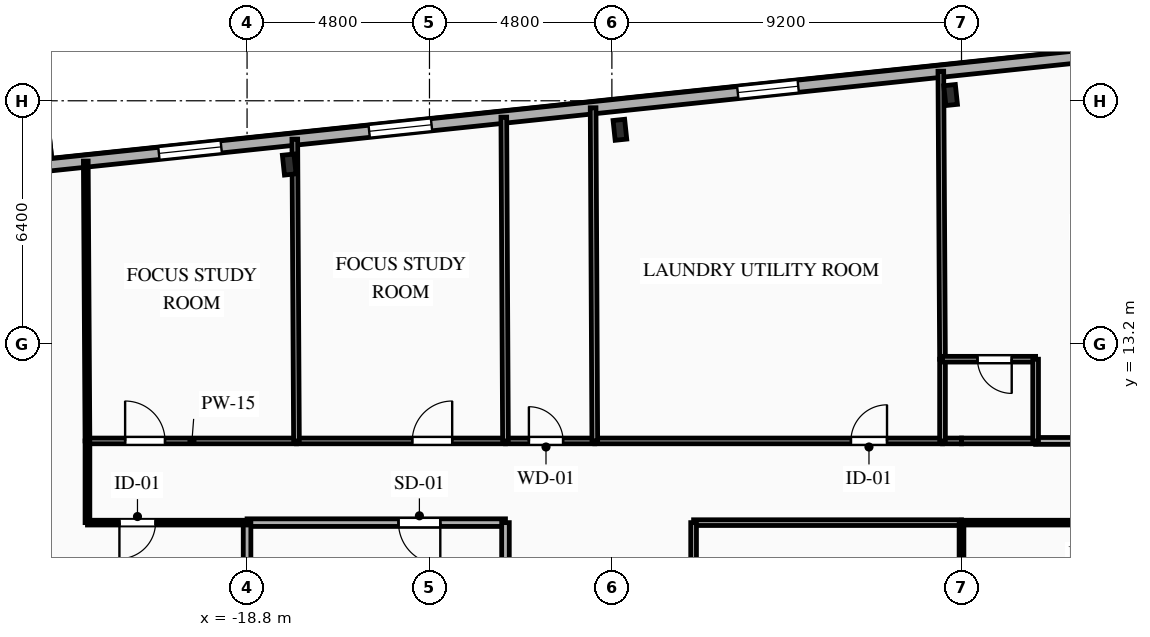
"""IFC4 building model, lengths in metres.
Left out: names, types, materials, properties, quantities, classifications, styles, units other than length and angle.
Written with IfcOpenShell. Run it as: python <this file> out.ifc"""

import sys

from ifc_helpers import new_model, si_unit, direction, frame, frame_2d, origin, origin_2d, place, context, subcontext, project, spatial, rectangle, i_section, extrude, element, fill, save


model = new_model("IFC4")
c1 = context("Model", 3, precision=1e-05, world=origin(), true_north=direction((0.0, 1.0)))
c2 = subcontext(c1, "Body", "Model", "MODEL_VIEW")
j1 = project(units=[si_unit("LENGTHUNIT", "METRE"), si_unit("PLANEANGLEUNIT", "RADIAN")], contexts=[c1])
p1 = place(None, origin())
s1 = spatial("IfcSite", under=j1, at=p1, CompositionType="ELEMENT")
p2 = place(p1, origin())
s2 = spatial("IfcBuilding", under=s1, at=p2, CompositionType="ELEMENT")
p3 = place(p2, frame((0.0, 0.0, 105.8)))
s3 = spatial("IfcBuildingStorey", under=s2, at=p3, CompositionType="ELEMENT", Elevation=105.8)
for number, where, z_axis, x_axis in (
    (1, (-0.287, 19.751, 0.0), (0.0, 0.0, 1.0), (0.995, 0.105, 0.0)),
    (2, (-8.989, 18.836, 0.0), (0.0, 0.0, 1.0), (0.995, 0.105, 0.0)),
    (3, (-17.691, 17.922, 0.0), (0.0, 0.0, 1.0), (0.995, 0.105, 0.0)),
):
    element("IfcColumn", number, at=place(p3, frame(where, z_axis=z_axis, x_axis=x_axis)), inside=s3, PredefinedType="COLUMN", context=c2, shape_type="SweptSolid", body=[
        extrude(i_section(OverallWidth=0.306, OverallDepth=0.524, WebThickness=0.021, FlangeThickness=0.04, FilletRadius=0.027, at=origin_2d()), origin(), (0.0, 0.0, 1.0), 3.35),
    ])
p4 = place(p3, frame((-27.107, 17.586, 0.0), z_axis=(0.0, 0.0, 1.0), x_axis=(0.994521628355, 0.104531003701, 0.0)))
e4 = element("IfcWall", 4, at=p4, inside=s3, PredefinedType="SOLIDWALL", context=c2, shape_type="SweptSolid", body=[
    extrude(rectangle(XDim=53.8, YDim=0.32, at=frame_2d((26.9, 0.0))), origin(), (0.0, 0.0, 1.0), 3.045),
])
p5 = place(p4, frame((1.482, 0.0, 0.85)))
e5 = element("IfcOpeningElement", 5, at=p5, cuts=e4, PredefinedType="OPENING", context=c2, shape_type="SweptSolid", body=[
    extrude(rectangle(XDim=1.6, YDim=1.85, at=frame_2d((0.8, 0.925))), frame((0.0, 0.17, 0.0), z_axis=(0.0, -1.0, 0.0), x_axis=(1.0, 0.0, 0.0)), (0.0, 0.0, 1.0), 0.34),
])
p6 = place(p4, frame((6.02, 0.0, 0.85)))
e6 = element("IfcOpeningElement", 6, at=p6, cuts=e4, PredefinedType="OPENING", context=c2, shape_type="SweptSolid", body=[
    extrude(rectangle(XDim=1.65, YDim=1.85, at=frame_2d((0.825, 0.925))), frame((0.0, 0.17, 0.0), z_axis=(0.0, -1.0, 0.0), x_axis=(1.0, 0.0, 0.0)), (0.0, 0.0, 1.0), 0.34),
])
p7 = place(p4, frame((11.584, 0.0, 0.85)))
e7 = element("IfcOpeningElement", 7, at=p7, cuts=e4, PredefinedType="OPENING", context=c2, shape_type="SweptSolid", body=[
    extrude(rectangle(XDim=1.65, YDim=1.85, at=frame_2d((0.825, 0.925))), frame((0.0, 0.17, 0.0), z_axis=(0.0, -1.0, 0.0), x_axis=(1.0, 0.0, 0.0)), (0.0, 0.0, 1.0), 0.34),
])
p8 = place(p4, frame((21.336, 0.0, 0.85)))
e8 = element("IfcOpeningElement", 8, at=p8, cuts=e4, PredefinedType="OPENING", context=c2, shape_type="SweptSolid", body=[
    extrude(rectangle(XDim=1.6, YDim=1.85, at=frame_2d((0.8, 0.925))), frame((0.0, 0.17, 0.0), z_axis=(0.0, -1.0, 0.0), x_axis=(1.0, 0.0, 0.0)), (0.0, 0.0, 1.0), 0.34),
])
p9 = place(p4, frame((31.404, 0.0, 0.85)))
e9 = element("IfcOpeningElement", 9, at=p9, cuts=e4, PredefinedType="OPENING", context=c2, shape_type="SweptSolid", body=[
    extrude(rectangle(XDim=2.2, YDim=1.85, at=frame_2d((1.1, 0.925))), frame((0.0, 0.17, 0.0), z_axis=(0.0, -1.0, 0.0), x_axis=(1.0, 0.0, 0.0)), (0.0, 0.0, 1.0), 0.34),
])
p10 = place(p4, frame((40.486, 0.0, 0.85)))
e10 = element("IfcOpeningElement", 10, at=p10, cuts=e4, PredefinedType="OPENING", context=c2, shape_type="SweptSolid", body=[
    extrude(rectangle(XDim=1.65, YDim=1.85, at=frame_2d((0.825, 0.925))), frame((0.0, 0.17, 0.0), z_axis=(0.0, -1.0, 0.0), x_axis=(1.0, 0.0, 0.0)), (0.0, 0.0, 1.0), 0.34),
])
p11 = place(p4, frame((46.53, 0.0, 0.85)))
e11 = element("IfcOpeningElement", 11, at=p11, cuts=e4, PredefinedType="OPENING", context=c2, shape_type="SweptSolid", body=[
    extrude(rectangle(XDim=1.65, YDim=1.85, at=frame_2d((0.825, 0.925))), frame((0.0, 0.17, 0.0), z_axis=(0.0, -1.0, 0.0), x_axis=(1.0, 0.0, 0.0)), (0.0, 0.0, 1.0), 0.34),
])
p12 = place(p4, frame((51.054, 0.0, 0.85)))
e12 = element("IfcOpeningElement", 12, at=p12, cuts=e4, PredefinedType="OPENING", context=c2, shape_type="SweptSolid", body=[
    extrude(rectangle(XDim=1.65, YDim=1.85, at=frame_2d((0.825, 0.925))), frame((0.0, 0.17, 0.0), z_axis=(0.0, -1.0, 0.0), x_axis=(1.0, 0.0, 0.0)), (0.0, 0.0, 1.0), 0.34),
])
p13 = place(p3, frame((-12.0, 8.5, 0.0), z_axis=(0.0, 0.0, 1.0), x_axis=(-1.0, 0.0, 0.0)))
e13 = element("IfcWall", 13, at=p13, inside=s3, PredefinedType="PARTITIONING", context=c2, shape_type="SweptSolid", body=[
    extrude(rectangle(XDim=6.8, YDim=0.2, at=frame_2d((3.4, 0.0))), origin(), (0.0, 0.0, 1.0), 3.045),
])
p14 = place(p13, frame((1.715, 0.0, 0.0)))
e14 = element("IfcOpeningElement", 14, at=p14, cuts=e13, PredefinedType="OPENING", context=c2, shape_type="SweptSolid", body=[
    extrude(rectangle(XDim=1.1, YDim=2.15, at=frame_2d((0.55, 1.075))), frame((0.0, 0.11, 0.0), z_axis=(0.0, -1.0, 0.0), x_axis=(1.0, 0.0, 0.0)), (0.0, 0.0, 1.0), 0.22),
])
p15 = place(p3, frame((-12.0, 5.6, 0.0), z_axis=(0.0, 0.0, 1.0), x_axis=(0.0, 1.0, 0.0)))
e15 = element("IfcWall", 15, at=p15, inside=s3, PredefinedType="PARTITIONING", context=c2, shape_type="SweptSolid", body=[
    extrude(rectangle(XDim=2.9, YDim=0.2, at=frame_2d((1.45, 0.0))), origin(), (0.0, 0.0, 1.0), 3.045),
])
p16 = place(p3, frame((-18.8, 8.5, 0.0), z_axis=(0.0, 0.0, 1.0), x_axis=(0.0, -1.0, 0.0)))
e16 = element("IfcWall", 16, at=p16, inside=s3, PredefinedType="PARTITIONING", context=c2, shape_type="SweptSolid", body=[
    extrude(rectangle(XDim=2.9, YDim=0.2, at=frame_2d((1.45, 0.0))), origin(), (0.0, 0.0, 1.0), 2.53),
])
p17 = place(p3, frame((-18.8, 8.5, 0.0), z_axis=(0.0, 0.0, 1.0), x_axis=(-1.0, 0.0, 0.0)))
e17 = element("IfcWall", 17, at=p17, inside=s3, PredefinedType="PARTITIONING", context=c2, shape_type="SweptSolid", body=[
    extrude(rectangle(XDim=4.2, YDim=0.125, at=frame_2d((2.1, 0.0))), origin(), (0.0, 0.0, 1.0), 3.045),
])
p18 = place(p17, frame((2.409, 0.0, 0.0)))
e18 = element("IfcOpeningElement", 18, at=p18, cuts=e17, PredefinedType="OPENING", context=c2, shape_type="SweptSolid", body=[
    extrude(rectangle(XDim=0.95, YDim=2.1, at=frame_2d((0.475, 1.05))), frame((0.0, 0.073, 0.0), z_axis=(0.0, -1.0, 0.0), x_axis=(1.0, 0.0, 0.0)), (0.0, 0.0, 1.0), 0.145),
])
p19 = place(p3, frame((-23.0, 8.5, 0.0), z_axis=(0.0, 0.0, 1.0), x_axis=(0.0, 1.0, 0.0)))
e19 = element("IfcWall", 19, at=p19, inside=s3, PredefinedType="PARTITIONING", context=c2, shape_type="SweptSolid", body=[
    extrude(rectangle(XDim=2.15, YDim=0.125, at=frame_2d((1.075, 0.0))), origin(), (0.0, 0.0, 1.0), 3.045),
])
p20 = place(p3, frame((-23.0, 10.65, 0.0), z_axis=(0.0, 0.0, 1.0), x_axis=(1.0, 0.0, 0.0)))
e20 = element("IfcWall", 20, at=p20, inside=s3, PredefinedType="PARTITIONING", context=c2, shape_type="SweptSolid", body=[
    extrude(rectangle(XDim=5.5, YDim=0.15, at=frame_2d((2.75, 0.0))), origin(), (0.0, 0.0, 1.0), 3.045),
])
p21 = place(p20, frame((0.991, 0.0, 0.0)))
e21 = element("IfcOpeningElement", 21, at=p21, cuts=e20, PredefinedType="OPENING", context=c2, shape_type="SweptSolid", body=[
    extrude(rectangle(XDim=1.05, YDim=2.15, at=frame_2d((0.525, 1.075))), frame((0.0, 0.085, 0.0), z_axis=(0.0, -1.0, 0.0), x_axis=(1.0, 0.0, 0.0)), (0.0, 0.0, 1.0), 0.17),
])
p22 = place(p3, frame((-17.5, 10.65, 0.0), z_axis=(0.0, 0.0, 1.0), x_axis=(1.0, 0.0, 0.0)))
e22 = element("IfcWall", 22, at=p22, inside=s3, PredefinedType="PARTITIONING", context=c2, shape_type="SweptSolid", body=[
    extrude(rectangle(XDim=5.5, YDim=0.15, at=frame_2d((2.75, 0.0))), origin(), (0.0, 0.0, 1.0), 3.045),
])
p23 = place(p22, frame((3.048, 0.0, 0.0)))
e23 = element("IfcOpeningElement", 23, at=p23, cuts=e22, PredefinedType="OPENING", context=c2, shape_type="SweptSolid", body=[
    extrude(rectangle(XDim=1.05, YDim=2.15, at=frame_2d((0.525, 1.075))), frame((0.0, 0.085, 0.0), z_axis=(0.0, -1.0, 0.0), x_axis=(1.0, 0.0, 0.0)), (0.0, 0.0, 1.0), 0.17),
])
p24 = place(p3, frame((-12.0, 10.65, 0.0), z_axis=(0.0, 0.0, 1.0), x_axis=(1.0, 0.0, 0.0)))
e24 = element("IfcWall", 24, at=p24, inside=s3, PredefinedType="PLUMBINGWALL", context=c2, shape_type="SweptSolid", body=[
    extrude(rectangle(XDim=2.35, YDim=0.15, at=frame_2d((1.175, 0.0))), origin(), (0.0, 0.0, 1.0), 3.045),
])
p25 = place(p24, frame((0.616, 0.0, 0.0)))
e25 = element("IfcOpeningElement", 25, at=p25, cuts=e24, PredefinedType="OPENING", context=c2, shape_type="SweptSolid", body=[
    extrude(rectangle(XDim=0.9, YDim=2.1, at=frame_2d((0.45, 1.05))), frame((0.0, 0.085, 0.0), z_axis=(0.0, -1.0, 0.0), x_axis=(1.0, 0.0, 0.0)), (0.0, 0.0, 1.0), 0.17),
])
p26 = place(p3, frame((-9.65, 10.65, 0.0), z_axis=(0.0, 0.0, 1.0), x_axis=(1.0, 0.0, 0.0)))
e26 = element("IfcWall", 26, at=p26, inside=s3, PredefinedType="PARTITIONING", context=c2, shape_type="SweptSolid", body=[
    extrude(rectangle(XDim=9.15, YDim=0.15, at=frame_2d((4.575, 0.0))), origin(), (0.0, 0.0, 1.0), 3.045),
])
p27 = place(p26, frame((6.74, 0.0, 0.0)))
e27 = element("IfcOpeningElement", 27, at=p27, cuts=e26, PredefinedType="OPENING", context=c2, shape_type="SweptSolid", body=[
    extrude(rectangle(XDim=0.95, YDim=2.1, at=frame_2d((0.475, 1.05))), frame((0.0, 0.085, 0.0), z_axis=(0.0, -1.0, 0.0), x_axis=(1.0, 0.0, 0.0)), (0.0, 0.0, 1.0), 0.17),
])
p28 = place(p3, frame((-0.5, 10.65, 0.0), z_axis=(0.0, 0.0, 1.0), x_axis=(1.0, 0.0, 0.0)))
e28 = element("IfcWall", 28, at=p28, inside=s3, PredefinedType="PLUMBINGWALL", context=c2, shape_type="SweptSolid", body=[
    extrude(rectangle(XDim=0.5, YDim=0.15, at=frame_2d((0.25, 0.0))), origin(), (0.0, 0.0, 1.0), 3.045),
])
p29 = place(p3, frame((0.0, 8.5, 0.0), z_axis=(0.0, 0.0, 1.0), x_axis=(-1.0, 0.0, 0.0)))
e29 = element("IfcWall", 29, at=p29, inside=s3, PredefinedType="PARTITIONING", context=c2, shape_type="SweptSolid", body=[
    extrude(rectangle(XDim=7.05, YDim=0.15, at=frame_2d((3.525, 0.0))), origin(), (0.0, 0.0, 1.0), 3.045),
])
p30 = place(p3, frame((1.95, 10.65, 0.0), z_axis=(0.0, 0.0, 1.0), x_axis=(1.0, 0.0, 0.0)))
e30 = element("IfcWall", 30, at=p30, inside=s3, PredefinedType="PARTITIONING", context=c2, shape_type="SweptSolid", body=[
    extrude(rectangle(XDim=9.05, YDim=0.18, at=frame_2d((4.525, 0.0))), origin(), (0.0, 0.0, 1.0), 3.045),
])
p31 = place(p30, frame((1.441, 0.0, 0.0)))
e31 = element("IfcOpeningElement", 31, at=p31, cuts=e30, PredefinedType="OPENING", context=c2, shape_type="SweptSolid", body=[
    extrude(rectangle(XDim=1.0, YDim=2.15, at=frame_2d((0.5, 1.075))), frame((0.0, 0.1, 0.0), z_axis=(0.0, -1.0, 0.0), x_axis=(1.0, 0.0, 0.0)), (0.0, 0.0, 1.0), 0.2),
])
p32 = place(p3, frame((0.0, 10.65, 0.0), z_axis=(0.0, 0.0, 1.0), x_axis=(1.0, 0.0, 0.0)))
e32 = element("IfcWall", 32, at=p32, inside=s3, PredefinedType="PLUMBINGWALL", context=c2, shape_type="SweptSolid", body=[
    extrude(rectangle(XDim=1.95, YDim=0.15, at=frame_2d((0.975, 0.0))), origin(), (0.0, 0.0, 1.0), 3.045),
])
p33 = place(p3, frame((7.05, 8.5, 0.0), z_axis=(0.0, 0.0, 1.0), x_axis=(-1.0, 0.0, 0.0)))
e33 = element("IfcWall", 33, at=p33, inside=s3, PredefinedType="PARTITIONING", context=c2, shape_type="SweptSolid", body=[
    extrude(rectangle(XDim=7.05, YDim=0.125, at=frame_2d((3.525, 0.0))), origin(), (0.0, 0.0, 1.0), 3.045),
])
p34 = place(p3, frame((-7.05, 8.5, 0.0), z_axis=(0.0, 0.0, 1.0), x_axis=(0.0, -1.0, 0.0)))
e34 = element("IfcWall", 34, at=p34, inside=s3, PredefinedType="PARTITIONING", context=c2, shape_type="SweptSolid", body=[
    extrude(rectangle(XDim=14.1, YDim=0.15, at=frame_2d((7.05, 0.0))), origin(), (0.0, 0.0, 1.0), 3.045),
])
p35 = place(p34, frame((8.074, 0.0, 0.0)))
e35 = element("IfcOpeningElement", 35, at=p35, cuts=e34, PredefinedType="OPENING", context=c2, shape_type="SweptSolid", body=[
    extrude(rectangle(XDim=0.95, YDim=2.1, at=frame_2d((0.475, 1.05))), frame((0.0, 0.085, 0.0), z_axis=(0.0, -1.0, 0.0), x_axis=(1.0, 0.0, 0.0)), (0.0, 0.0, 1.0), 0.17),
])
p36 = place(p3, frame((-23.044, 18.013, 0.0), z_axis=(0.0, 0.0, 1.0), x_axis=(0.005968459246, -0.999982188588, 0.0)))
e36 = element("IfcWall", 36, at=p36, inside=s3, PredefinedType="PARTITIONING", context=c2, shape_type="SweptSolid", body=[
    extrude(rectangle(XDim=7.363, YDim=0.125, at=frame_2d((3.682, 0.0))), origin(), (0.0, 0.0, 1.0), 3.045),
])
p37 = place(p3, frame((-17.544, 18.591, 0.0), z_axis=(0.0, 0.0, 1.0), x_axis=(0.005533949572, -0.999984687584, 0.0)))
e37 = element("IfcWall", 37, at=p37, inside=s3, PredefinedType="PARTITIONING", context=c2, shape_type="SweptSolid", body=[
    extrude(rectangle(XDim=7.941, YDim=0.15, at=frame_2d((3.97, 0.0))), origin(), (0.0, 0.0, 1.0), 2.53),
])
p38 = place(p3, frame((-12.044, 19.169, 0.0), z_axis=(0.0, 0.0, 1.0), x_axis=(0.005158411336, -0.999986695308, 0.0)))
e38 = element("IfcWall", 38, at=p38, inside=s3, PredefinedType="PLUMBINGWALL", context=c2, shape_type="SweptSolid", body=[
    extrude(rectangle(XDim=8.519, YDim=0.15, at=frame_2d((4.26, 0.0))), origin(), (0.0, 0.0, 1.0), 3.045),
])
p39 = place(p3, frame((-9.694, 19.416, 0.0), z_axis=(0.0, 0.0, 1.0), x_axis=(0.005013026743, -0.999987434702, 0.0)))
e39 = element("IfcWall", 39, at=p39, inside=s3, PredefinedType="PLUMBINGWALL", context=c2, shape_type="SweptSolid", body=[
    extrude(rectangle(XDim=8.766, YDim=0.15, at=frame_2d((4.383, 0.0))), origin(), (0.0, 0.0, 1.0), 3.045),
])
p40 = place(p3, frame((-0.544, 20.378, 0.0), z_axis=(0.0, 0.0, 1.0), x_axis=(0.005799245221, -0.999983184236, 0.0)))
e40 = element("IfcWall", 40, at=p40, inside=s3, PredefinedType="PARTITIONING", context=c2, shape_type="SweptSolid", body=[
    extrude(rectangle(XDim=7.578, YDim=0.15, at=frame_2d((3.789, 0.0))), origin(), (0.0, 0.0, 1.0), 3.045),
])
p41 = place(p3, frame((-0.5, 12.8, 0.0), z_axis=(0.0, 0.0, 1.0), x_axis=(0.0, -1.0, 0.0)))
e41 = element("IfcWall", 41, at=p41, inside=s3, PredefinedType="PLUMBINGWALL", context=c2, shape_type="SweptSolid", body=[
    extrude(rectangle(XDim=2.15, YDim=0.15, at=frame_2d((1.075, 0.0))), origin(), (0.0, 0.0, 1.0), 3.045),
])
p42 = place(p3, frame((1.95, 12.8, 0.0), z_axis=(0.0, 0.0, 1.0), x_axis=(-1.0, 0.0, 0.0)))
e42 = element("IfcWall", 42, at=p42, inside=s3, PredefinedType="PLUMBINGWALL", context=c2, shape_type="SweptSolid", body=[
    extrude(rectangle(XDim=2.45, YDim=0.15, at=frame_2d((1.225, 0.0))), origin(), (0.0, 0.0, 1.0), 3.045),
])
p43 = place(p42, frame((0.629, 0.0, 0.0)))
e43 = element("IfcOpeningElement", 43, at=p43, cuts=e42, PredefinedType="OPENING", context=c2, shape_type="SweptSolid", body=[
    extrude(rectangle(XDim=0.9, YDim=2.1, at=frame_2d((0.45, 1.05))), frame((0.0, 0.085, 0.0), z_axis=(0.0, -1.0, 0.0), x_axis=(1.0, 0.0, 0.0)), (0.0, 0.0, 1.0), 0.17),
])
p44 = place(p3, frame((1.95, 10.65, 0.0), z_axis=(0.0, 0.0, 1.0), x_axis=(0.0, 1.0, 0.0)))
e44 = element("IfcWall", 44, at=p44, inside=s3, PredefinedType="PLUMBINGWALL", context=c2, shape_type="SweptSolid", body=[
    extrude(rectangle(XDim=2.15, YDim=0.15, at=frame_2d((1.075, 0.0))), origin(), (0.0, 0.0, 1.0), 3.045),
])
p45 = place(p3, frame((0.0, 8.5, 0.0), z_axis=(0.0, 0.0, 1.0), x_axis=(0.0, -1.0, 0.0)))
e45 = element("IfcWall", 45, at=p45, inside=s3, PredefinedType="PARTITIONING", context=c2, shape_type="SweptSolid", body=[
    extrude(rectangle(XDim=14.1, YDim=0.125, at=frame_2d((7.05, 0.0))), origin(), (0.0, 0.0, 1.0), 3.045),
])
p46 = place(p6, origin())
e46 = element("IfcWindow", 46, at=p46, inside=s3, PartitioningType="SINGLE_PANEL", PredefinedType="WINDOW", context=c2, shape_type="SweptSolid", body=[
    extrude(rectangle(XDim=1.65, YDim=1.85, at=frame_2d((0.825, 0.925))), frame((0.0, 0.03, 0.0), z_axis=(0.0, -1.0, 0.0), x_axis=(1.0, 0.0, 0.0)), (0.0, 0.0, 1.0), 0.06),
])
fill(e6, e46)
p47 = place(p7, origin())
e47 = element("IfcWindow", 47, at=p47, inside=s3, PartitioningType="SINGLE_PANEL", PredefinedType="WINDOW", context=c2, shape_type="SweptSolid", body=[
    extrude(rectangle(XDim=1.65, YDim=1.85, at=frame_2d((0.825, 0.925))), frame((0.0, 0.03, 0.0), z_axis=(0.0, -1.0, 0.0), x_axis=(1.0, 0.0, 0.0)), (0.0, 0.0, 1.0), 0.06),
])
fill(e7, e47)
p48 = place(p8, origin())
e48 = element("IfcWindow", 48, at=p48, inside=s3, PartitioningType="SINGLE_PANEL", PredefinedType="WINDOW", context=c2, shape_type="SweptSolid", body=[
    extrude(rectangle(XDim=1.6, YDim=1.85, at=frame_2d((0.8, 0.925))), frame((0.0, 0.03, 0.0), z_axis=(0.0, -1.0, 0.0), x_axis=(1.0, 0.0, 0.0)), (0.0, 0.0, 1.0), 0.06),
])
fill(e8, e48)
p49 = place(p14, origin())
e49 = element("IfcDoor", 49, at=p49, inside=s3, OperationType="SINGLE_SWING_LEFT", PredefinedType="DOOR", context=c2, shape_type="SweptSolid", body=[
    extrude(rectangle(XDim=1.1, YDim=2.15, at=frame_2d((0.55, 1.075))), frame((0.0, 0.025, 0.0), z_axis=(0.0, -1.0, 0.0), x_axis=(1.0, 0.0, 0.0)), (0.0, 0.0, 1.0), 0.05),
])
fill(e14, e49)
p50 = place(p18, origin())
e50 = element("IfcDoor", 50, at=p50, inside=s3, OperationType="SINGLE_SWING_RIGHT", PredefinedType="DOOR", context=c2, shape_type="SweptSolid", body=[
    extrude(rectangle(XDim=0.95, YDim=2.1, at=frame_2d((0.475, 1.05))), frame((0.0, 0.025, 0.0), z_axis=(0.0, -1.0, 0.0), x_axis=(1.0, 0.0, 0.0)), (0.0, 0.0, 1.0), 0.05),
])
fill(e18, e50)
p51 = place(p21, origin())
e51 = element("IfcDoor", 51, at=p51, inside=s3, OperationType="SINGLE_SWING_LEFT", PredefinedType="DOOR", context=c2, shape_type="SweptSolid", body=[
    extrude(rectangle(XDim=1.05, YDim=2.15, at=frame_2d((0.525, 1.075))), frame((0.0, 0.025, 0.0), z_axis=(0.0, -1.0, 0.0), x_axis=(1.0, 0.0, 0.0)), (0.0, 0.0, 1.0), 0.05),
])
fill(e21, e51)
p52 = place(p23, origin())
e52 = element("IfcDoor", 52, at=p52, inside=s3, OperationType="SINGLE_SWING_RIGHT", PredefinedType="DOOR", context=c2, shape_type="SweptSolid", body=[
    extrude(rectangle(XDim=1.05, YDim=2.15, at=frame_2d((0.525, 1.075))), frame((0.0, 0.025, 0.0), z_axis=(0.0, -1.0, 0.0), x_axis=(1.0, 0.0, 0.0)), (0.0, 0.0, 1.0), 0.05),
])
fill(e23, e52)
p53 = place(p25, origin())
e53 = element("IfcDoor", 53, at=p53, inside=s3, OperationType="SINGLE_SWING_LEFT", PredefinedType="DOOR", context=c2, shape_type="SweptSolid", body=[
    extrude(rectangle(XDim=0.9, YDim=2.1, at=frame_2d((0.45, 1.05))), frame((0.0, 0.025, 0.0), z_axis=(0.0, -1.0, 0.0), x_axis=(1.0, 0.0, 0.0)), (0.0, 0.0, 1.0), 0.05),
])
fill(e25, e53)
p54 = place(p27, origin())
e54 = element("IfcDoor", 54, at=p54, inside=s3, OperationType="SINGLE_SWING_RIGHT", PredefinedType="DOOR", context=c2, shape_type="SweptSolid", body=[
    extrude(rectangle(XDim=0.95, YDim=2.1, at=frame_2d((0.475, 1.05))), frame((0.0, 0.025, 0.0), z_axis=(0.0, -1.0, 0.0), x_axis=(1.0, 0.0, 0.0)), (0.0, 0.0, 1.0), 0.05),
])
fill(e27, e54)
p55 = place(p43, origin())
e55 = element("IfcDoor", 55, at=p55, inside=s3, OperationType="SINGLE_SWING_LEFT", PredefinedType="DOOR", context=c2, shape_type="SweptSolid", body=[
    extrude(rectangle(XDim=0.9, YDim=2.1, at=frame_2d((0.45, 1.05))), frame((0.0, 0.025, 0.0), z_axis=(0.0, -1.0, 0.0), x_axis=(1.0, 0.0, 0.0)), (0.0, 0.0, 1.0), 0.05),
])
fill(e43, e55)
save(model, sys.argv[1])
